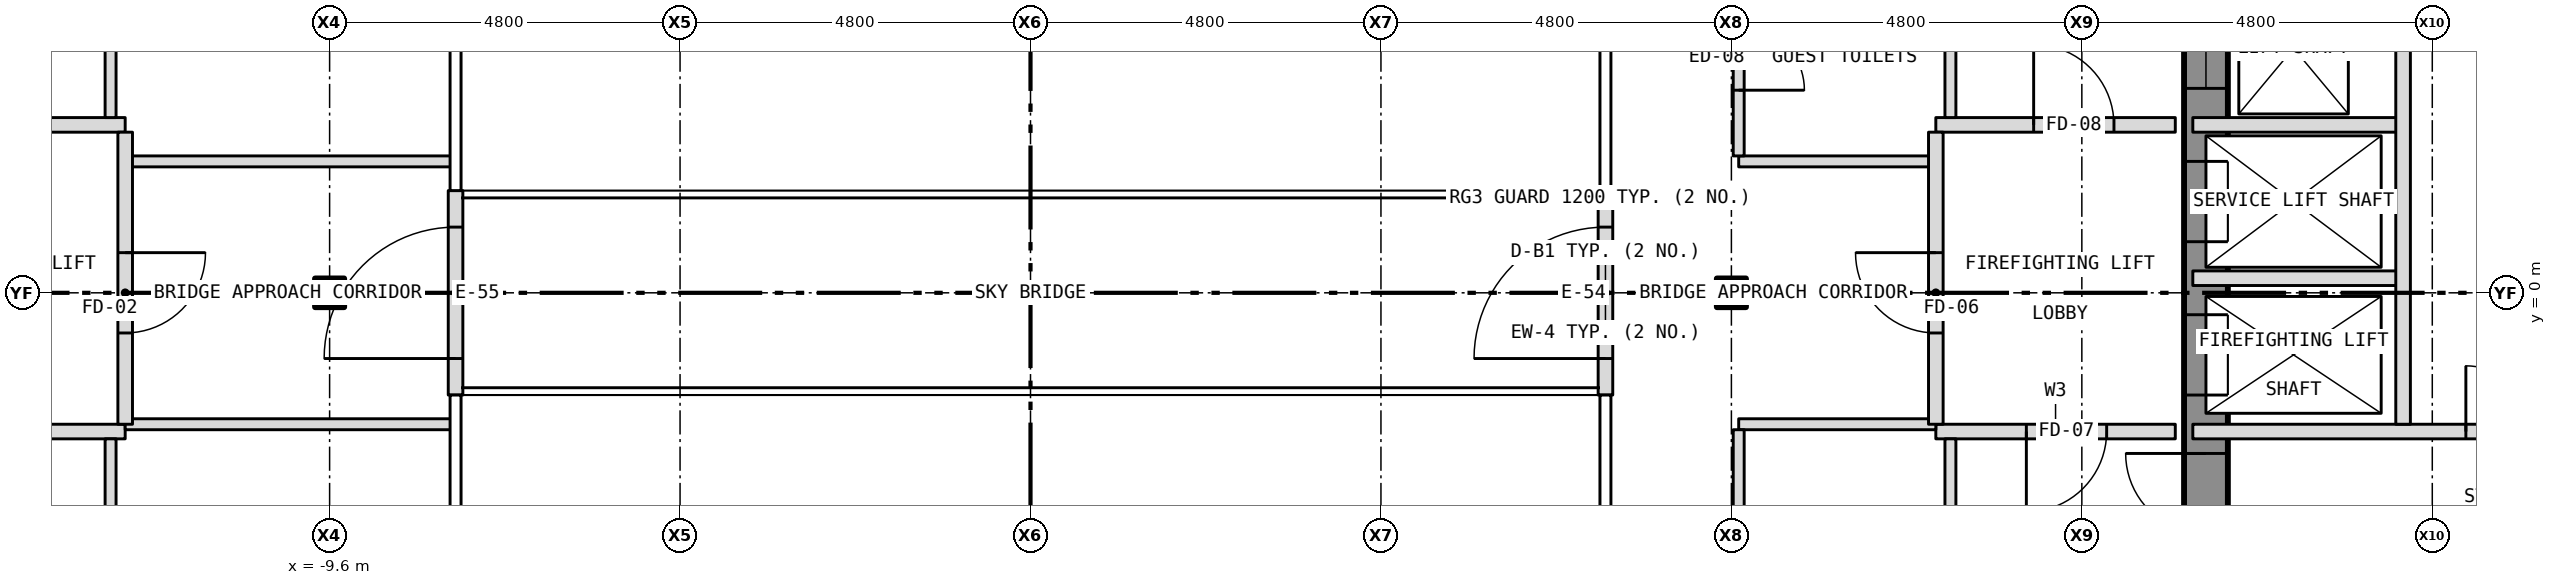
"""IFC4 building model, lengths in metres.
Left out: names, types, materials, properties, quantities, classifications, styles, units other than length and angle.
Written with IfcOpenShell. Run it as: python <this file> out.ifc"""

import sys

from ifc_helpers import new_model, si_unit, direction, frame, frame_2d, origin, origin_2d, place, context, subcontext, project, spatial, rectangle, i_section, extrude, element, fill, save


model = new_model("IFC4")
c1 = context("Model", 3, precision=1e-05, world=origin(), true_north=direction((0.0, 1.0)))
c2 = subcontext(c1, "Body", "Model", "MODEL_VIEW")
j1 = project(units=[si_unit("LENGTHUNIT", "METRE"), si_unit("PLANEANGLEUNIT", "RADIAN")], contexts=[c1])
p1 = place(None, origin())
s1 = spatial("IfcSite", under=j1, at=p1, CompositionType="ELEMENT")
p2 = place(p1, origin())
s2 = spatial("IfcBuilding", under=s1, at=p2, CompositionType="ELEMENT")
p3 = place(p2, frame((0.0, 0.0, 134.5)))
s3 = spatial("IfcBuildingStorey", under=s2, at=p3, CompositionType="ELEMENT", Elevation=134.5)
for number, where, z_axis, x_axis in (
    (1, (-9.6, 0.0, -0.15), (0.0, 0.0, 1.0), (1.0, 0.0, 0.0)),
    (2, (9.6, 0.0, -0.15), (0.0, 0.0, 1.0), (1.0, 0.0, 0.0)),
):
    element("IfcColumn", number, at=place(p3, frame(where, z_axis=z_axis, x_axis=x_axis)), inside=s3, PredefinedType="COLUMN", context=c2, shape_type="SweptSolid", body=[
        extrude(i_section(OverallWidth=0.399, OverallDepth=0.394, WebThickness=0.023, FlangeThickness=0.037, at=origin_2d()), origin(), (0.0, 0.0, 1.0), 3.35),
    ])
p4 = place(p3, frame((16.1, -10.8, 0.0), z_axis=(0.0, 0.0, 1.0), x_axis=(0.0, 1.0, 0.0)))
e3 = element("IfcWall", 3, at=p4, inside=s3, PredefinedType="SHEAR", context=c2, shape_type="SweptSolid", body=[
    extrude(rectangle(XDim=21.6, YDim=0.6, at=frame_2d((10.8, 0.0))), origin(), (0.0, 0.0, 1.0), 2.9),
])
p5 = place(p4, frame((9.4, 0.0, 0.0)))
e4 = element("IfcOpeningElement", 4, at=p5, cuts=e3, PredefinedType="OPENING", context=c2, shape_type="SweptSolid", body=[
    extrude(rectangle(XDim=1.1, YDim=2.1, at=frame_2d((0.55, 1.05))), frame((0.0, 0.312, 0.0), z_axis=(0.0, -1.0, 0.0), x_axis=(1.0, 0.0, 0.0)), (0.0, 0.0, 1.0), 0.624),
])
p6 = place(p4, frame((11.5, 0.0, 0.0)))
e5 = element("IfcOpeningElement", 5, at=p6, cuts=e3, PredefinedType="OPENING", context=c2, shape_type="SweptSolid", body=[
    extrude(rectangle(XDim=1.1, YDim=2.1, at=frame_2d((0.55, 1.05))), frame((0.0, 0.312, 0.0), z_axis=(0.0, -1.0, 0.0), x_axis=(1.0, 0.0, 0.0)), (0.0, 0.0, 1.0), 0.624),
])
p7 = place(p4, frame((13.6, 0.0, 0.0)))
e6 = element("IfcOpeningElement", 6, at=p7, cuts=e3, PredefinedType="OPENING", context=c2, shape_type="SweptSolid", body=[
    extrude(rectangle(XDim=1.1, YDim=2.1, at=frame_2d((0.55, 1.05))), frame((0.0, 0.312, 0.0), z_axis=(0.0, -1.0, 0.0), x_axis=(1.0, 0.0, 0.0)), (0.0, 0.0, 1.0), 0.624),
])
p8 = place(p4, frame((15.7, 0.0, 0.0)))
e7 = element("IfcOpeningElement", 7, at=p8, cuts=e3, PredefinedType="OPENING", context=c2, shape_type="SweptSolid", body=[
    extrude(rectangle(XDim=1.1, YDim=2.1, at=frame_2d((0.55, 1.05))), frame((0.0, 0.312, 0.0), z_axis=(0.0, -1.0, 0.0), x_axis=(1.0, 0.0, 0.0)), (0.0, 0.0, 1.0), 0.624),
])
p9 = place(p4, frame((17.8, 0.0, 0.0)))
e8 = element("IfcOpeningElement", 8, at=p9, cuts=e3, PredefinedType="OPENING", context=c2, shape_type="SweptSolid", body=[
    extrude(rectangle(XDim=1.1, YDim=2.1, at=frame_2d((0.55, 1.05))), frame((0.0, 0.312, 0.0), z_axis=(0.0, -1.0, 0.0), x_axis=(1.0, 0.0, 0.0)), (0.0, 0.0, 1.0), 0.624),
])
p10 = place(p4, frame((5.642, 0.0, 0.0)))
e9 = element("IfcOpeningElement", 9, at=p10, cuts=e3, PredefinedType="OPENING", context=c2, shape_type="SweptSolid", body=[
    extrude(rectangle(XDim=1.1, YDim=2.1, at=frame_2d((0.55, 1.05))), frame((0.0, 0.312, 0.0), z_axis=(0.0, -1.0, 0.0), x_axis=(1.0, 0.0, 0.0)), (0.0, 0.0, 1.0), 0.624),
])
p11 = place(p4, frame((7.5, 0.0, 0.0)))
e10 = element("IfcOpeningElement", 10, at=p11, cuts=e3, PredefinedType="OPENING", context=c2, shape_type="SweptSolid", body=[
    extrude(rectangle(XDim=1.1, YDim=2.1, at=frame_2d((0.55, 1.05))), frame((0.0, 0.312, 0.0), z_axis=(0.0, -1.0, 0.0), x_axis=(1.0, 0.0, 0.0)), (0.0, 0.0, 1.0), 0.624),
])
p12 = place(p3, frame((7.875, -1.4, 0.0), z_axis=(0.0, 0.0, 1.0), x_axis=(0.0, 1.0, 0.0)))
e11 = element("IfcWall", 11, at=p12, inside=s3, PredefinedType="SOLIDWALL", context=c2, shape_type="SweptSolid", body=[
    extrude(rectangle(XDim=2.8, YDim=0.2, at=frame_2d((1.4, 0.0))), origin(), (0.0, 0.0, 1.0), 3.5),
])
p13 = place(p12, frame((0.5, 0.0, 0.0)))
e12 = element("IfcOpeningElement", 12, at=p13, cuts=e11, PredefinedType="OPENING", context=c2, shape_type="SweptSolid", body=[
    extrude(rectangle(XDim=1.8, YDim=2.1, at=frame_2d((0.9, 1.05))), frame((0.0, 0.112, 0.0), z_axis=(0.0, -1.0, 0.0), x_axis=(1.0, 0.0, 0.0)), (0.0, 0.0, 1.0), 0.224),
])
p14 = place(p3, frame((-7.875, -1.4, 0.0), z_axis=(0.0, 0.0, 1.0), x_axis=(0.0, 1.0, 0.0)))
e13 = element("IfcWall", 13, at=p14, inside=s3, PredefinedType="SOLIDWALL", context=c2, shape_type="SweptSolid", body=[
    extrude(rectangle(XDim=2.8, YDim=0.2, at=frame_2d((1.4, 0.0))), origin(), (0.0, 0.0, 1.0), 3.5),
])
p15 = place(p14, frame((0.5, 0.0, 0.0)))
e14 = element("IfcOpeningElement", 14, at=p15, cuts=e13, PredefinedType="OPENING", context=c2, shape_type="SweptSolid", body=[
    extrude(rectangle(XDim=1.8, YDim=2.1, at=frame_2d((0.9, 1.05))), frame((0.0, 0.112, 0.0), z_axis=(0.0, -1.0, 0.0), x_axis=(1.0, 0.0, 0.0)), (0.0, 0.0, 1.0), 0.224),
])
p16 = place(p3, frame((-15.68, -1.9, 0.0), z_axis=(0.0, 0.0, 1.0), x_axis=(1.0, 0.0, 0.0)))
e15 = element("IfcWall", 15, at=p16, inside=s3, PredefinedType="PARTITIONING", context=c2, shape_type="SweptSolid", body=[
    extrude(rectangle(XDim=3.28, YDim=0.2, at=frame_2d((1.64, 0.0))), origin(), (0.0, 0.0, 1.0), 3.2),
])
p17 = place(p16, frame((0.94, 0.0, 0.0)))
e16 = element("IfcOpeningElement", 16, at=p17, cuts=e15, PredefinedType="OPENING", context=c2, shape_type="SweptSolid", body=[
    extrude(rectangle(XDim=1.1, YDim=2.1, at=frame_2d((0.55, 1.05))), frame((0.0, 0.112, 0.0), z_axis=(0.0, -1.0, 0.0), x_axis=(1.0, 0.0, 0.0)), (0.0, 0.0, 1.0), 0.224),
])
p18 = place(p3, frame((12.4, -1.9, 0.0), z_axis=(0.0, 0.0, 1.0), x_axis=(1.0, 0.0, 0.0)))
e17 = element("IfcWall", 17, at=p18, inside=s3, PredefinedType="PARTITIONING", context=c2, shape_type="SweptSolid", body=[
    extrude(rectangle(XDim=3.28, YDim=0.2, at=frame_2d((1.64, 0.0))), origin(), (0.0, 0.0, 1.0), 3.2),
])
p19 = place(p18, frame((1.24, 0.0, 0.0)))
e18 = element("IfcOpeningElement", 18, at=p19, cuts=e17, PredefinedType="OPENING", context=c2, shape_type="SweptSolid", body=[
    extrude(rectangle(XDim=1.1, YDim=2.1, at=frame_2d((0.55, 1.05))), frame((0.0, 0.112, 0.0), z_axis=(0.0, -1.0, 0.0), x_axis=(1.0, 0.0, 0.0)), (0.0, 0.0, 1.0), 0.224),
])
p20 = place(p3, frame((15.92, -1.9, 0.0), z_axis=(0.0, 0.0, 1.0), x_axis=(1.0, 0.0, 0.0)))
e19 = element("IfcWall", 19, at=p20, inside=s3, PredefinedType="PARTITIONING", context=c2, shape_type="SweptSolid", body=[
    extrude(rectangle(XDim=6.76, YDim=0.2, at=frame_2d((3.38, 0.0))), origin(), (0.0, 0.0, 1.0), 2.9),
])
p21 = place(p20, frame((3.74, 0.0, 0.0)))
e20 = element("IfcOpeningElement", 20, at=p21, cuts=e19, PredefinedType="OPENING", context=c2, shape_type="SweptSolid", body=[
    extrude(rectangle(XDim=0.9, YDim=2.1, at=frame_2d((0.45, 1.05))), frame((0.0, 0.112, 0.0), z_axis=(0.0, -1.0, 0.0), x_axis=(1.0, 0.0, 0.0)), (0.0, 0.0, 1.0), 0.224),
])
p22 = place(p3, frame((-12.4, -1.8, 0.0), z_axis=(0.0, 0.0, 1.0), x_axis=(1.0, 0.0, 0.0)))
e21 = element("IfcWall", 21, at=p22, inside=s3, PredefinedType="PARTITIONING", context=c2, shape_type="SweptSolid", body=[
    extrude(rectangle(XDim=4.48, YDim=0.15, at=frame_2d((2.24, 0.0))), origin(), (0.0, 0.0, 1.0), 3.2),
])
p23 = place(p3, frame((9.7, -1.8, 0.0), z_axis=(0.0, 0.0, 1.0), x_axis=(1.0, 0.0, 0.0)))
e22 = element("IfcWall", 22, at=p23, inside=s3, PredefinedType="PARTITIONING", context=c2, shape_type="SweptSolid", body=[
    extrude(rectangle(XDim=2.7, YDim=0.15, at=frame_2d((1.35, 0.0))), origin(), (0.0, 0.0, 1.0), 3.2),
])
p24 = place(p3, frame((15.92, 0.2, 0.0), z_axis=(0.0, 0.0, 1.0), x_axis=(1.0, 0.0, 0.0)))
e23 = element("IfcWall", 23, at=p24, inside=s3, PredefinedType="PARTITIONING", context=c2, shape_type="SweptSolid", body=[
    extrude(rectangle(XDim=2.88, YDim=0.2, at=frame_2d((1.44, 0.0))), origin(), (0.0, 0.0, 1.0), 2.9),
])
p25 = place(p3, frame((-12.4, 1.8, 0.0), z_axis=(0.0, 0.0, 1.0), x_axis=(1.0, 0.0, 0.0)))
e24 = element("IfcWall", 24, at=p25, inside=s3, PredefinedType="PARTITIONING", context=c2, shape_type="SweptSolid", body=[
    extrude(rectangle(XDim=4.48, YDim=0.15, at=frame_2d((2.24, 0.0))), origin(), (0.0, 0.0, 1.0), 3.2),
])
p26 = place(p3, frame((9.7, 1.8, 0.0), z_axis=(0.0, 0.0, 1.0), x_axis=(1.0, 0.0, 0.0)))
e25 = element("IfcWall", 25, at=p26, inside=s3, PredefinedType="PARTITIONING", context=c2, shape_type="SweptSolid", body=[
    extrude(rectangle(XDim=2.7, YDim=0.15, at=frame_2d((1.35, 0.0))), origin(), (0.0, 0.0, 1.0), 3.2),
])
p27 = place(p3, frame((-15.68, 2.3, 0.0), z_axis=(0.0, 0.0, 1.0), x_axis=(1.0, 0.0, 0.0)))
e26 = element("IfcWall", 26, at=p27, inside=s3, PredefinedType="PARTITIONING", context=c2, shape_type="SweptSolid", body=[
    extrude(rectangle(XDim=3.28, YDim=0.2, at=frame_2d((1.64, 0.0))), origin(), (0.0, 0.0, 1.0), 3.2),
])
p28 = place(p27, frame((0.84, 0.0, 0.0)))
e27 = element("IfcOpeningElement", 27, at=p28, cuts=e26, PredefinedType="OPENING", context=c2, shape_type="SweptSolid", body=[
    extrude(rectangle(XDim=1.1, YDim=2.1, at=frame_2d((0.55, 1.05))), frame((0.0, 0.112, 0.0), z_axis=(0.0, -1.0, 0.0), x_axis=(1.0, 0.0, 0.0)), (0.0, 0.0, 1.0), 0.224),
])
p29 = place(p3, frame((12.4, 2.3, 0.0), z_axis=(0.0, 0.0, 1.0), x_axis=(1.0, 0.0, 0.0)))
e28 = element("IfcWall", 28, at=p29, inside=s3, PredefinedType="PARTITIONING", context=c2, shape_type="SweptSolid", body=[
    extrude(rectangle(XDim=3.28, YDim=0.2, at=frame_2d((1.64, 0.0))), origin(), (0.0, 0.0, 1.0), 3.2),
])
p30 = place(p29, frame((1.34, 0.0, 0.0)))
e29 = element("IfcOpeningElement", 29, at=p30, cuts=e28, PredefinedType="OPENING", context=c2, shape_type="SweptSolid", body=[
    extrude(rectangle(XDim=1.1, YDim=2.1, at=frame_2d((0.55, 1.05))), frame((0.0, 0.112, 0.0), z_axis=(0.0, -1.0, 0.0), x_axis=(1.0, 0.0, 0.0)), (0.0, 0.0, 1.0), 0.224),
])
p31 = place(p3, frame((15.92, 2.3, 0.0), z_axis=(0.0, 0.0, 1.0), x_axis=(1.0, 0.0, 0.0)))
e30 = element("IfcWall", 30, at=p31, inside=s3, PredefinedType="PARTITIONING", context=c2, shape_type="SweptSolid", body=[
    extrude(rectangle(XDim=2.88, YDim=0.2, at=frame_2d((1.44, 0.0))), origin(), (0.0, 0.0, 1.0), 2.9),
])
p32 = place(p3, frame((-12.6, -12.525, 0.0), z_axis=(0.0, 0.0, 1.0), x_axis=(0.0, 1.0, 0.0)))
e31 = element("IfcWall", 31, at=p32, inside=s3, PredefinedType="PARTITIONING", context=c2, shape_type="SweptSolid", body=[
    extrude(rectangle(XDim=10.525, YDim=0.15, at=frame_2d((5.262, 0.0))), origin(), (0.0, 0.0, 1.0), 3.2),
])
p33 = place(p32, frame((4.825, 0.0, 0.0)))
e32 = element("IfcOpeningElement", 32, at=p33, cuts=e31, PredefinedType="OPENING", context=c2, shape_type="SweptSolid", body=[
    extrude(rectangle(XDim=0.9, YDim=2.1, at=frame_2d((0.45, 1.05))), frame((0.0, 0.087, 0.0), z_axis=(0.0, -1.0, 0.0), x_axis=(1.0, 0.0, 0.0)), (0.0, 0.0, 1.0), 0.174),
])
p34 = place(p3, frame((-12.6, 2.4, 0.0), z_axis=(0.0, 0.0, 1.0), x_axis=(0.0, 1.0, 0.0)))
e33 = element("IfcWall", 33, at=p34, inside=s3, PredefinedType="PARTITIONING", context=c2, shape_type="SweptSolid", body=[
    extrude(rectangle(XDim=5.025, YDim=0.15, at=frame_2d((2.513, 0.0))), origin(), (0.0, 0.0, 1.0), 3.2),
])
p35 = place(p3, frame((-12.4, -1.8, 0.0), z_axis=(0.0, 0.0, 1.0), x_axis=(0.0, 1.0, 0.0)))
e34 = element("IfcWall", 34, at=p35, inside=s3, PredefinedType="PARTITIONING", context=c2, shape_type="SweptSolid", body=[
    extrude(rectangle(XDim=4.0, YDim=0.2, at=frame_2d((2.0, 0.0))), origin(), (0.0, 0.0, 1.0), 3.2),
])
p36 = place(p35, frame((1.25, 0.0, 0.0)))
e35 = element("IfcOpeningElement", 35, at=p36, cuts=e34, PredefinedType="OPENING", context=c2, shape_type="SweptSolid", body=[
    extrude(rectangle(XDim=1.1, YDim=2.1, at=frame_2d((0.55, 1.05))), frame((0.0, 0.112, 0.0), z_axis=(0.0, -1.0, 0.0), x_axis=(1.0, 0.0, 0.0)), (0.0, 0.0, 1.0), 0.224),
])
p37 = place(p3, frame((9.7, -9.399, 0.0), z_axis=(0.0, 0.0, 1.0), x_axis=(0.0, 1.0, 0.0)))
e36 = element("IfcWall", 36, at=p37, inside=s3, PredefinedType="PARTITIONING", context=c2, shape_type="SweptSolid", body=[
    extrude(rectangle(XDim=7.524, YDim=0.15, at=frame_2d((3.762, 0.0))), origin(), (0.0, 0.0, 1.0), 2.578),
])
p38 = place(p37, frame((1.749, 0.0, 0.0)))
e37 = element("IfcOpeningElement", 37, at=p38, cuts=e36, PredefinedType="OPENING", context=c2, shape_type="SweptSolid", body=[
    extrude(rectangle(XDim=0.9, YDim=2.1, at=frame_2d((0.45, 1.05))), frame((0.0, 0.087, 0.0), z_axis=(0.0, -1.0, 0.0), x_axis=(1.0, 0.0, 0.0)), (0.0, 0.0, 1.0), 0.174),
])
p39 = place(p3, frame((9.7, 1.875, 0.0), z_axis=(0.0, 0.0, 1.0), x_axis=(0.0, 1.0, 0.0)))
e38 = element("IfcWall", 38, at=p39, inside=s3, PredefinedType="PARTITIONING", context=c2, shape_type="SweptSolid", body=[
    extrude(rectangle(XDim=5.55, YDim=0.15, at=frame_2d((2.775, 0.0))), origin(), (0.0, 0.0, 1.0), 2.578),
])
p40 = place(p39, frame((0.9, 0.0, 0.0)))
e39 = element("IfcOpeningElement", 39, at=p40, cuts=e38, PredefinedType="OPENING", context=c2, shape_type="SweptSolid", body=[
    extrude(rectangle(XDim=0.9, YDim=2.1, at=frame_2d((0.45, 1.05))), frame((0.0, 0.087, 0.0), z_axis=(0.0, -1.0, 0.0), x_axis=(1.0, 0.0, 0.0)), (0.0, 0.0, 1.0), 0.174),
])
p41 = place(p3, frame((12.4, -1.8, 0.0), z_axis=(0.0, 0.0, 1.0), x_axis=(0.0, 1.0, 0.0)))
e40 = element("IfcWall", 40, at=p41, inside=s3, PredefinedType="PARTITIONING", context=c2, shape_type="SweptSolid", body=[
    extrude(rectangle(XDim=4.0, YDim=0.2, at=frame_2d((2.0, 0.0))), origin(), (0.0, 0.0, 1.0), 3.2),
])
p42 = place(p41, frame((1.25, 0.0, 0.0)))
e41 = element("IfcOpeningElement", 41, at=p42, cuts=e40, PredefinedType="OPENING", context=c2, shape_type="SweptSolid", body=[
    extrude(rectangle(XDim=1.1, YDim=2.1, at=frame_2d((0.55, 1.05))), frame((0.0, 0.112, 0.0), z_axis=(0.0, -1.0, 0.0), x_axis=(1.0, 0.0, 0.0)), (0.0, 0.0, 1.0), 0.224),
])
p43 = place(p3, frame((12.6, -12.525, 0.0), z_axis=(0.0, 0.0, 1.0), x_axis=(0.0, 1.0, 0.0)))
e42 = element("IfcWall", 42, at=p43, inside=s3, PredefinedType="PARTITIONING", context=c2, shape_type="SweptSolid", body=[
    extrude(rectangle(XDim=10.525, YDim=0.15, at=frame_2d((5.262, 0.0))), origin(), (0.0, 0.0, 1.0), 3.2),
])
p44 = place(p3, frame((12.6, 2.4, 0.0), z_axis=(0.0, 0.0, 1.0), x_axis=(0.0, 1.0, 0.0)))
e43 = element("IfcWall", 43, at=p44, inside=s3, PredefinedType="PARTITIONING", context=c2, shape_type="SweptSolid", body=[
    extrude(rectangle(XDim=5.025, YDim=0.15, at=frame_2d((2.513, 0.0))), origin(), (0.0, 0.0, 1.0), 3.2),
])
p45 = place(p3, frame((18.8, -1.8, 0.0), z_axis=(0.0, 0.0, 1.0), x_axis=(0.0, 1.0, 0.0)))
e44 = element("IfcWall", 44, at=p45, inside=s3, PredefinedType="PARTITIONING", context=c2, shape_type="SweptSolid", body=[
    extrude(rectangle(XDim=6.15, YDim=0.2, at=frame_2d((3.075, 0.0))), origin(), (0.0, 0.0, 1.0), 2.9),
])
p46 = place(p13, origin())
e45 = element("IfcDoor", 45, at=p46, inside=s3, OperationType="DOUBLE_DOOR_DOUBLE_SWING", PredefinedType="DOOR", context=c2, shape_type="SweptSolid", body=[
    extrude(rectangle(XDim=1.8, YDim=2.1, at=frame_2d((0.9, 1.05))), frame((0.0, 0.025, 0.0), z_axis=(0.0, -1.0, 0.0), x_axis=(1.0, 0.0, 0.0)), (0.0, 0.0, 1.0), 0.05),
])
fill(e12, e45)
p47 = place(p15, origin())
e46 = element("IfcDoor", 46, at=p47, inside=s3, OperationType="DOUBLE_DOOR_DOUBLE_SWING", PredefinedType="DOOR", context=c2, shape_type="SweptSolid", body=[
    extrude(rectangle(XDim=1.8, YDim=2.1, at=frame_2d((0.9, 1.05))), frame((0.0, 0.025, 0.0), z_axis=(0.0, -1.0, 0.0), x_axis=(1.0, 0.0, 0.0)), (0.0, 0.0, 1.0), 0.05),
])
fill(e14, e46)
p48 = place(p5, origin())
e47 = element("IfcDoor", 47, at=p48, inside=s3, OperationType="SLIDING_TO_LEFT", PredefinedType="DOOR", context=c2, shape_type="SweptSolid", body=[
    extrude(rectangle(XDim=1.1, YDim=2.1, at=frame_2d((0.55, 1.05))), frame((0.0, 0.025, 0.0), z_axis=(0.0, -1.0, 0.0), x_axis=(1.0, 0.0, 0.0)), (0.0, 0.0, 1.0), 0.05),
])
fill(e4, e47)
p49 = place(p6, origin())
e48 = element("IfcDoor", 48, at=p49, inside=s3, OperationType="SLIDING_TO_LEFT", PredefinedType="DOOR", context=c2, shape_type="SweptSolid", body=[
    extrude(rectangle(XDim=1.1, YDim=2.1, at=frame_2d((0.55, 1.05))), frame((0.0, 0.025, 0.0), z_axis=(0.0, -1.0, 0.0), x_axis=(1.0, 0.0, 0.0)), (0.0, 0.0, 1.0), 0.05),
])
fill(e5, e48)
p50 = place(p7, origin())
e49 = element("IfcDoor", 49, at=p50, inside=s3, OperationType="SLIDING_TO_LEFT", PredefinedType="DOOR", context=c2, shape_type="SweptSolid", body=[
    extrude(rectangle(XDim=1.1, YDim=2.1, at=frame_2d((0.55, 1.05))), frame((0.0, 0.025, 0.0), z_axis=(0.0, -1.0, 0.0), x_axis=(1.0, 0.0, 0.0)), (0.0, 0.0, 1.0), 0.05),
])
fill(e6, e49)
p51 = place(p36, origin())
e50 = element("IfcDoor", 50, at=p51, inside=s3, OperationType="SINGLE_SWING_RIGHT", PredefinedType="DOOR", context=c2, shape_type="SweptSolid", body=[
    extrude(rectangle(XDim=1.1, YDim=2.1, at=frame_2d((0.55, 1.05))), frame((0.0, 0.025, 0.0), z_axis=(0.0, -1.0, 0.0), x_axis=(1.0, 0.0, 0.0)), (0.0, 0.0, 1.0), 0.05),
])
fill(e35, e50)
p52 = place(p11, origin())
e51 = element("IfcDoor", 51, at=p52, inside=s3, OperationType="SINGLE_SWING_RIGHT", PredefinedType="DOOR", context=c2, shape_type="SweptSolid", body=[
    extrude(rectangle(XDim=1.1, YDim=2.1, at=frame_2d((0.55, 1.05))), frame((0.0, 0.025, 0.0), z_axis=(0.0, -1.0, 0.0), x_axis=(1.0, 0.0, 0.0)), (0.0, 0.0, 1.0), 0.05),
])
fill(e10, e51)
p53 = place(p21, origin())
e52 = element("IfcDoor", 52, at=p53, inside=s3, OperationType="SINGLE_SWING_LEFT", PredefinedType="DOOR", context=c2, shape_type="SweptSolid", body=[
    extrude(rectangle(XDim=0.9, YDim=2.1, at=frame_2d((0.45, 1.05))), frame((0.0, 0.025, 0.0), z_axis=(0.0, -1.0, 0.0), x_axis=(1.0, 0.0, 0.0)), (0.0, 0.0, 1.0), 0.05),
])
fill(e20, e52)
p54 = place(p42, origin())
e53 = element("IfcDoor", 53, at=p54, inside=s3, OperationType="SINGLE_SWING_RIGHT", PredefinedType="DOOR", context=c2, shape_type="SweptSolid", body=[
    extrude(rectangle(XDim=1.1, YDim=2.1, at=frame_2d((0.55, 1.05))), frame((0.0, 0.025, 0.0), z_axis=(0.0, -1.0, 0.0), x_axis=(1.0, 0.0, 0.0)), (0.0, 0.0, 1.0), 0.05),
])
fill(e41, e53)
p55 = place(p19, origin())
e54 = element("IfcDoor", 54, at=p55, inside=s3, OperationType="SINGLE_SWING_LEFT", PredefinedType="DOOR", context=c2, shape_type="SweptSolid", body=[
    extrude(rectangle(XDim=1.1, YDim=2.1, at=frame_2d((0.55, 1.05))), frame((0.0, 0.025, 0.0), z_axis=(0.0, -1.0, 0.0), x_axis=(1.0, 0.0, 0.0)), (0.0, 0.0, 1.0), 0.05),
])
fill(e18, e54)
p56 = place(p30, origin())
e55 = element("IfcDoor", 55, at=p56, inside=s3, OperationType="SINGLE_SWING_LEFT", PredefinedType="DOOR", context=c2, shape_type="SweptSolid", body=[
    extrude(rectangle(XDim=1.1, YDim=2.1, at=frame_2d((0.55, 1.05))), frame((0.0, 0.025, 0.0), z_axis=(0.0, -1.0, 0.0), x_axis=(1.0, 0.0, 0.0)), (0.0, 0.0, 1.0), 0.05),
])
fill(e29, e55)
p57 = place(p40, origin())
e56 = element("IfcDoor", 56, at=p57, inside=s3, OperationType="SINGLE_SWING_LEFT", PredefinedType="DOOR", context=c2, shape_type="SweptSolid", body=[
    extrude(rectangle(XDim=0.9, YDim=2.1, at=frame_2d((0.45, 1.05))), frame((0.0, 0.025, 0.0), z_axis=(0.0, -1.0, 0.0), x_axis=(1.0, 0.0, 0.0)), (0.0, 0.0, 1.0), 0.05),
])
fill(e39, e56)
save(model, sys.argv[1])
